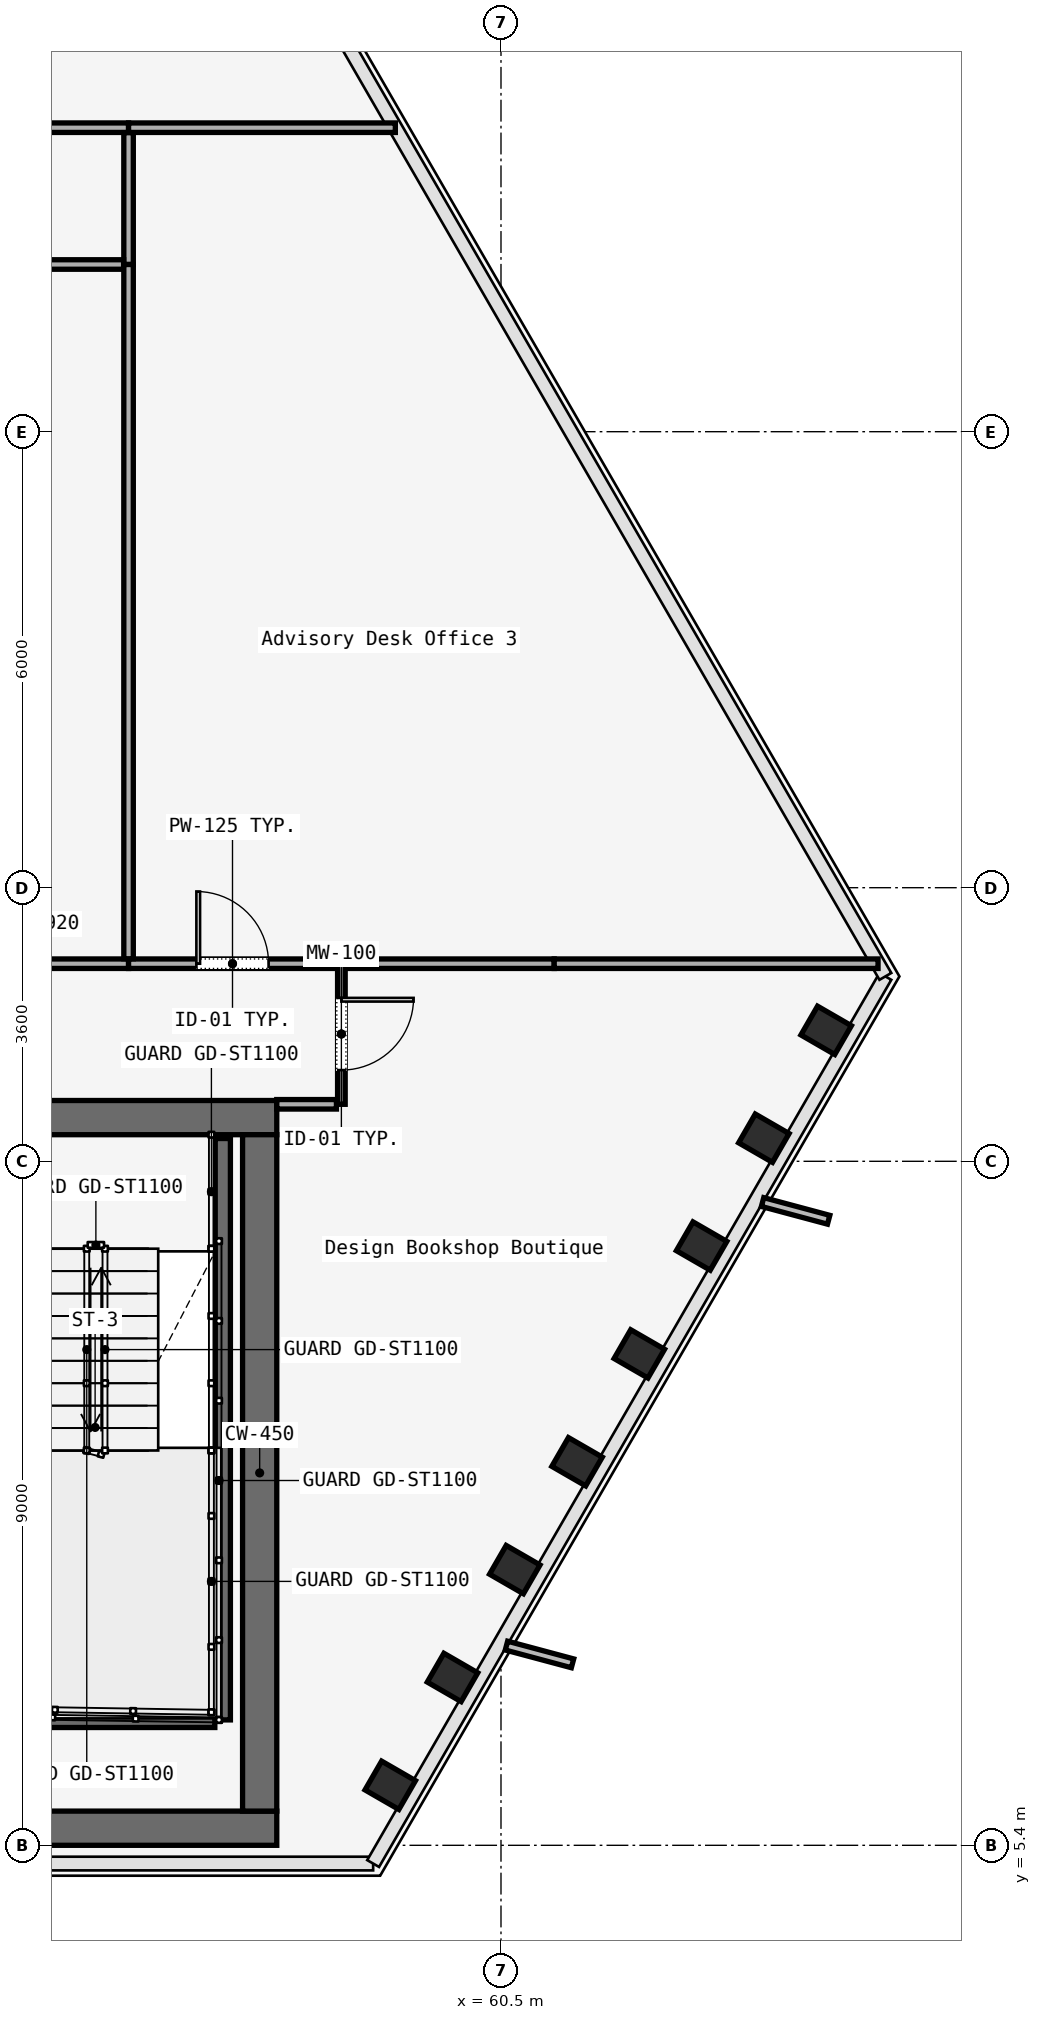
"""IFC4 building model, lengths in metres.
Left out: names, types, materials, properties, quantities, classifications, styles, units other than length and angle.
Written with IfcOpenShell. Run it as: python <this file> out.ifc"""

import sys

from ifc_helpers import new_model, si_unit, direction, frame, frame_2d, origin, origin_2d, place, context, subcontext, project, spatial, rectangle, i_section, extrude, element, fill, save


model = new_model("IFC4")
c1 = context("Model", 3, precision=1e-05, world=origin(), true_north=direction((0.0, 1.0)))
c2 = subcontext(c1, "Body", "Model", "MODEL_VIEW")
j1 = project(units=[si_unit("LENGTHUNIT", "METRE"), si_unit("PLANEANGLEUNIT", "RADIAN")], contexts=[c1])
p1 = place(None, origin())
s1 = spatial("IfcSite", under=j1, at=p1, CompositionType="ELEMENT")
p2 = place(p1, origin())
s2 = spatial("IfcBuilding", under=s1, at=p2, CompositionType="ELEMENT")
p3 = place(p2, frame((0.0, 0.0, 100.6)))
s3 = spatial("IfcBuildingStorey", under=s2, at=p3, CompositionType="ELEMENT", Elevation=100.6)
p4 = place(p3, frame((26.45, 14.975, 0.0), z_axis=(0.0, 0.0, 1.0), x_axis=(1.0, 0.0, 0.0)))
e1 = element("IfcWall", 1, at=p4, inside=s3, PredefinedType="SOLIDWALL", context=c2, shape_type="SweptSolid", body=[
    extrude(rectangle(XDim=31.1, YDim=0.45, at=frame_2d((15.55, 0.0))), origin(), (0.0, 0.0, 1.0), 3.58),
])
p5 = place(p4, frame((1.65, 0.0, 0.0)))
e2 = element("IfcOpeningElement", 2, at=p5, cuts=e1, PredefinedType="OPENING", context=c2, shape_type="SweptSolid", body=[
    extrude(rectangle(XDim=1.1, YDim=2.2, at=frame_2d((0.55, 1.1))), frame((0.0, 0.225, 0.0), z_axis=(0.0, -1.0, 0.0), x_axis=(1.0, 0.0, 0.0)), (0.0, 0.0, 1.0), 0.45),
])
p6 = place(p4, frame((13.65, 0.0, 0.0)))
e3 = element("IfcOpeningElement", 3, at=p6, cuts=e1, PredefinedType="OPENING", context=c2, shape_type="SweptSolid", body=[
    extrude(rectangle(XDim=1.1, YDim=2.2, at=frame_2d((0.55, 1.1))), frame((0.0, 0.225, 0.0), z_axis=(0.0, -1.0, 0.0), x_axis=(1.0, 0.0, 0.0)), (0.0, 0.0, 1.0), 0.45),
])
p7 = place(p4, frame((25.55, 0.0, 0.0)))
e4 = element("IfcOpeningElement", 4, at=p7, cuts=e1, PredefinedType="OPENING", context=c2, shape_type="SweptSolid", body=[
    extrude(rectangle(XDim=1.1, YDim=2.2, at=frame_2d((0.55, 1.1))), frame((0.0, 0.225, 0.0), z_axis=(0.0, -1.0, 0.0), x_axis=(1.0, 0.0, 0.0)), (0.0, 0.0, 1.0), 0.45),
])
p8 = place(p4, frame((10.7, 0.0, 0.0)))
e5 = element("IfcOpeningElement", 5, at=p8, cuts=e1, PredefinedType="OPENING", context=c2, shape_type="SweptSolid", body=[
    extrude(rectangle(XDim=1.4, YDim=2.2, at=frame_2d((0.7, 1.1))), frame((0.0, 0.225, 0.0), z_axis=(0.0, -1.0, 0.0), x_axis=(1.0, 0.0, 0.0)), (0.0, 0.0, 1.0), 0.45),
])
p9 = place(p4, frame((19.35, 0.0, 0.0)))
e6 = element("IfcOpeningElement", 6, at=p9, cuts=e1, PredefinedType="OPENING", context=c2, shape_type="SweptSolid", body=[
    extrude(rectangle(XDim=1.1, YDim=2.2, at=frame_2d((0.55, 1.1))), frame((0.0, 0.225, 0.0), z_axis=(0.0, -1.0, 0.0), x_axis=(1.0, 0.0, 0.0)), (0.0, 0.0, 1.0), 0.45),
])
p10 = place(p4, frame((21.4, 0.0, 0.0)))
e7 = element("IfcOpeningElement", 7, at=p10, cuts=e1, PredefinedType="OPENING", context=c2, shape_type="SweptSolid", body=[
    extrude(rectangle(XDim=0.9, YDim=2.1, at=frame_2d((0.45, 1.05))), frame((0.0, 0.225, 0.0), z_axis=(0.0, -1.0, 0.0), x_axis=(1.0, 0.0, 0.0)), (0.0, 0.0, 1.0), 0.45),
])
p11 = place(p4, frame((23.35, 0.0, 0.0)))
e8 = element("IfcOpeningElement", 8, at=p11, cuts=e1, PredefinedType="OPENING", context=c2, shape_type="SweptSolid", body=[
    extrude(rectangle(XDim=1.3, YDim=2.3, at=frame_2d((0.65, 1.15))), frame((0.0, 0.225, 0.0), z_axis=(0.0, -1.0, 0.0), x_axis=(1.0, 0.0, 0.0)), (0.0, 0.0, 1.0), 0.45),
])
p12 = place(p3, frame((26.45, 5.625, 0.0), z_axis=(0.0, 0.0, 1.0), x_axis=(1.0, 0.0, 0.0)))
e9 = element("IfcWall", 9, at=p12, inside=s3, PredefinedType="SOLIDWALL", context=c2, shape_type="SweptSolid", body=[
    extrude(rectangle(XDim=31.1, YDim=0.45, at=frame_2d((15.55, 0.0))), origin(), (0.0, 0.0, 1.0), 3.58),
])
p13 = place(p3, frame((57.325, 5.85, 0.0), z_axis=(0.0, 0.0, 1.0), x_axis=(0.0, 1.0, 0.0)))
e10 = element("IfcWall", 10, at=p13, inside=s3, PredefinedType="SOLIDWALL", context=c2, shape_type="SweptSolid", body=[
    extrude(rectangle(XDim=8.9, YDim=0.45, at=frame_2d((4.45, 0.0))), origin(), (0.0, 0.0, 1.0), 3.58),
])
for number, where, z_axis, x_axis in (
    (11, (59.043, 6.19, 0.0), (0.0, 0.0, 1.0), (0.5, 0.866, 0.0)),
    (12, (59.862, 7.609, 0.0), (0.0, 0.0, 1.0), (0.5, 0.866, 0.0)),
    (13, (60.682, 9.028, 0.0), (0.0, 0.0, 1.0), (0.5, 0.866, 0.0)),
    (14, (61.501, 10.447, 0.0), (0.0, 0.0, 1.0), (0.5, 0.866, 0.0)),
    (15, (62.32, 11.866, 0.0), (0.0, 0.0, 1.0), (0.5, 0.866, 0.0)),
    (16, (63.139, 13.285, 0.0), (0.0, 0.0, 1.0), (0.5, 0.866, 0.0)),
    (17, (63.959, 14.704, 0.0), (0.0, 0.0, 1.0), (0.5, 0.866, 0.0)),
    (18, (64.778, 16.123, 0.0), (0.0, 0.0, 1.0), (0.5, 0.866, 0.0)),
):
    element("IfcColumn", number, at=place(p3, frame(where, z_axis=z_axis, x_axis=x_axis)), inside=s3, PredefinedType="COLUMN", context=c2, shape_type="SweptSolid", body=[
        extrude(i_section(OverallWidth=0.437, OverallDepth=0.514, WebThickness=0.061, FlangeThickness=0.077, FilletRadius=0.015, at=origin_2d()), origin(), (0.0, 0.0, 1.0), 3.58),
    ])
p14 = place(p3, frame((56.84, 14.7, 0.0), z_axis=(0.0, 0.0, 1.0), x_axis=(0.0, -1.0, 0.0)))
e19 = element("IfcWall", 19, at=p14, inside=s3, PredefinedType="SOLIDWALL", context=c2, shape_type="SweptSolid", body=[
    extrude(rectangle(XDim=7.65, YDim=0.2, at=frame_2d((3.825, 0.0))), origin(), (0.0, 0.0, 1.0), 3.8),
])
p15 = place(p3, frame((53.62, 7.05, 0.0), z_axis=(0.0, 0.0, 1.0), x_axis=(1.0, 0.0, 0.0)))
e20 = element("IfcWall", 20, at=p15, inside=s3, PredefinedType="SOLIDWALL", context=c2, shape_type="SweptSolid", body=[
    extrude(rectangle(XDim=3.115, YDim=0.2, at=frame_2d((1.558, 0.0))), origin(), (0.0, 0.0, 1.0), 3.8),
])
p16 = place(p3, frame((58.4, 17.0, 0.0), z_axis=(0.0, 0.0, 1.0), x_axis=(0.0, -1.0, 0.0)))
e21 = element("IfcWall", 21, at=p16, inside=s3, PredefinedType="MOVABLE", context=c2, shape_type="SweptSolid", body=[
    extrude(rectangle(XDim=1.85, YDim=0.1, at=frame_2d((0.925, 0.0))), origin(), (0.0, 0.0, 1.0), 2.95),
])
p17 = place(p16, frame((0.45, 0.0, 0.0)))
e22 = element("IfcOpeningElement", 22, at=p17, cuts=e21, PredefinedType="OPENING", context=c2, shape_type="SweptSolid", body=[
    extrude(rectangle(XDim=0.95, YDim=2.2, at=frame_2d((0.475, 1.1))), frame((0.0, 0.05, 0.0), z_axis=(0.0, -1.0, 0.0), x_axis=(1.0, 0.0, 0.0)), (0.0, 0.0, 1.0), 0.1),
])
p18 = place(p3, frame((58.335, 15.15, 0.0), z_axis=(0.0, 0.0, 1.0), x_axis=(-1.0, 0.0, 0.0)))
e23 = element("IfcWall", 23, at=p18, inside=s3, PredefinedType="PARTITIONING", context=c2, shape_type="SweptSolid", body=[
    extrude(rectangle(XDim=0.785, YDim=0.125, at=frame_2d((0.393, 0.0))), origin(), (0.0, 0.0, 1.0), 2.95),
])
p19 = place(p3, frame((49.4, 28.0, 0.0), z_axis=(0.0, 0.0, 1.0), x_axis=(1.0, 0.0, 0.0)))
e24 = element("IfcWall", 24, at=p19, inside=s3, PredefinedType="PARTITIONING", context=c2, shape_type="SweptSolid", body=[
    extrude(rectangle(XDim=6.2, YDim=0.125, at=frame_2d((3.1, 0.0))), origin(), (0.0, 0.0, 1.0), 2.95),
])
p20 = place(p19, frame((2.625, 0.0, 0.0)))
e25 = element("IfcOpeningElement", 25, at=p20, cuts=e24, PredefinedType="OPENING", context=c2, shape_type="SweptSolid", body=[
    extrude(rectangle(XDim=0.95, YDim=2.2, at=frame_2d((0.475, 1.1))), frame((0.0, 0.062, 0.0), z_axis=(0.0, -1.0, 0.0), x_axis=(1.0, 0.0, 0.0)), (0.0, 0.0, 1.0), 0.125),
])
p21 = place(p3, frame((55.6, 27.935, 0.0), z_axis=(0.0, 0.0, 1.0), x_axis=(0.0, -1.0, 0.0)))
e26 = element("IfcWall", 26, at=p21, inside=s3, PredefinedType="PARTITIONING", context=c2, shape_type="SweptSolid", body=[
    extrude(rectangle(XDim=1.735, YDim=0.125, at=frame_2d((0.868, 0.0))), origin(), (0.0, 0.0, 1.0), 2.95),
])
p22 = place(p3, frame((55.535, 26.2, 0.0), z_axis=(0.0, 0.0, 1.0), x_axis=(-1.0, 0.0, 0.0)))
e27 = element("IfcWall", 27, at=p22, inside=s3, PredefinedType="PARTITIONING", context=c2, shape_type="SweptSolid", body=[
    extrude(rectangle(XDim=10.759, YDim=0.125, at=frame_2d((5.379, 0.0))), origin(), (0.0, 0.0, 1.0), 2.95),
])
p23 = place(p3, frame((44.776, 17.0, 0.0), z_axis=(0.0, 0.0, 1.0), x_axis=(1.0, 0.0, 0.0)))
e28 = element("IfcWall", 28, at=p23, inside=s3, PredefinedType="PARTITIONING", context=c2, shape_type="SweptSolid", body=[
    extrude(rectangle(XDim=10.824, YDim=0.125, at=frame_2d((5.412, 0.0))), origin(), (0.0, 0.0, 1.0), 2.95),
])
p24 = place(p23, frame((4.937, 0.0, 0.0)))
e29 = element("IfcOpeningElement", 29, at=p24, cuts=e28, PredefinedType="OPENING", context=c2, shape_type="SweptSolid", body=[
    extrude(rectangle(XDim=0.95, YDim=2.2, at=frame_2d((0.475, 1.1))), frame((0.0, 0.062, 0.0), z_axis=(0.0, -1.0, 0.0), x_axis=(1.0, 0.0, 0.0)), (0.0, 0.0, 1.0), 0.125),
])
p25 = place(p3, frame((55.6, 17.0, 0.0), z_axis=(0.0, 0.0, 1.0), x_axis=(1.0, 0.0, 0.0)))
e30 = element("IfcWall", 30, at=p25, inside=s3, PredefinedType="PARTITIONING", context=c2, shape_type="SweptSolid", body=[
    extrude(rectangle(XDim=2.735, YDim=0.125, at=frame_2d((1.367, 0.0))), origin(), (0.0, 0.0, 1.0), 2.95),
])
p26 = place(p25, frame((0.893, 0.0, 0.0)))
e31 = element("IfcOpeningElement", 31, at=p26, cuts=e30, PredefinedType="OPENING", context=c2, shape_type="SweptSolid", body=[
    extrude(rectangle(XDim=0.95, YDim=2.2, at=frame_2d((0.475, 1.1))), frame((0.0, 0.062, 0.0), z_axis=(0.0, -1.0, 0.0), x_axis=(1.0, 0.0, 0.0)), (0.0, 0.0, 1.0), 0.125),
])
p27 = place(p3, frame((58.465, 17.0, 0.0), z_axis=(0.0, 0.0, 1.0), x_axis=(1.0, 0.0, 0.0)))
e32 = element("IfcWall", 32, at=p27, inside=s3, PredefinedType="PARTITIONING", context=c2, shape_type="SweptSolid", body=[
    extrude(rectangle(XDim=2.735, YDim=0.125, at=frame_2d((1.367, 0.0))), origin(), (0.0, 0.0, 1.0), 2.95),
])
p28 = place(p3, frame((61.2, 17.0, 0.0), z_axis=(0.0, 0.0, 1.0), x_axis=(1.0, 0.0, 0.0)))
e33 = element("IfcWall", 33, at=p28, inside=s3, PredefinedType="PARTITIONING", context=c2, shape_type="SweptSolid", body=[
    extrude(rectangle(XDim=4.261, YDim=0.125, at=frame_2d((2.13, 0.0))), origin(), (0.0, 0.0, 1.0), 2.95),
])
p29 = place(p3, frame((55.6, 26.2, 0.0), z_axis=(0.0, 0.0, 1.0), x_axis=(0.0, -1.0, 0.0)))
e34 = element("IfcWall", 34, at=p29, inside=s3, PredefinedType="PARTITIONING", context=c2, shape_type="SweptSolid", body=[
    extrude(rectangle(XDim=9.135, YDim=0.125, at=frame_2d((4.567, 0.0))), origin(), (0.0, 0.0, 1.0), 2.95),
])
p30 = place(p3, frame((55.6, 28.0, 0.0), z_axis=(0.0, 0.0, 1.0), x_axis=(1.0, 0.0, 0.0)))
e35 = element("IfcWall", 35, at=p30, inside=s3, PredefinedType="PARTITIONING", context=c2, shape_type="SweptSolid", body=[
    extrude(rectangle(XDim=3.51, YDim=0.125, at=frame_2d((1.755, 0.0))), origin(), (0.0, 0.0, 1.0), 2.95),
])
p31 = place(p17, origin())
e36 = element("IfcDoor", 36, at=p31, inside=s3, OperationType="SINGLE_SWING_LEFT", PredefinedType="DOOR", context=c2, shape_type="SweptSolid", body=[
    extrude(rectangle(XDim=0.95, YDim=2.2, at=frame_2d((0.475, 1.1))), frame((0.0, 0.025, 0.0), z_axis=(0.0, -1.0, 0.0), x_axis=(1.0, 0.0, 0.0)), (0.0, 0.0, 1.0), 0.05),
])
fill(e22, e36)
p32 = place(p26, origin())
e37 = element("IfcDoor", 37, at=p32, inside=s3, OperationType="SINGLE_SWING_RIGHT", PredefinedType="DOOR", context=c2, shape_type="SweptSolid", body=[
    extrude(rectangle(XDim=0.95, YDim=2.2, at=frame_2d((0.475, 1.1))), frame((0.0, 0.025, 0.0), z_axis=(0.0, -1.0, 0.0), x_axis=(1.0, 0.0, 0.0)), (0.0, 0.0, 1.0), 0.05),
])
fill(e31, e37)
save(model, sys.argv[1])
